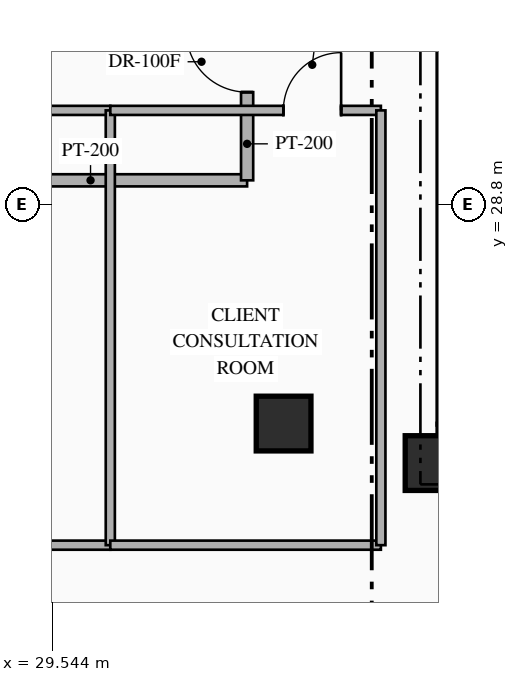
"""IFC4 building model, lengths in metres.
Left out: names, types, materials, properties, quantities, classifications, styles, units other than length and angle.
Written with IfcOpenShell. Run it as: python <this file> out.ifc"""

import sys

from ifc_helpers import new_model, si_unit, direction, frame, frame_2d, origin, origin_2d, place, context, subcontext, project, spatial, rectangle, hollow_rectangle, extrude, element, fill, save


model = new_model("IFC4")
c1 = context("Model", 3, precision=1e-05, world=origin(), true_north=direction((0.0, 1.0)))
c2 = subcontext(c1, "Body", "Model", "MODEL_VIEW")
j1 = project(units=[si_unit("LENGTHUNIT", "METRE"), si_unit("PLANEANGLEUNIT", "RADIAN")], contexts=[c1])
p1 = place(None, origin())
s1 = spatial("IfcSite", under=j1, at=p1, CompositionType="ELEMENT")
p2 = place(p1, origin())
s2 = spatial("IfcBuilding", under=s1, at=p2, CompositionType="ELEMENT")
p3 = place(p2, frame((0.0, 0.0, 108.45)))
s3 = spatial("IfcBuildingStorey", under=s2, at=p3, CompositionType="ELEMENT", Elevation=108.45)
p4 = place(p3, frame((35.89, 24.89, 0.0), z_axis=(0.0, 0.0, 1.0), x_axis=(1.0, 0.0, 0.0)))
e1 = element("IfcWall", 1, at=p4, inside=s3, PredefinedType="SHEAR", context=c2, shape_type="SweptSolid", body=[
    extrude(rectangle(XDim=7.76, YDim=0.6, at=frame_2d((3.88, 0.0))), origin(), (0.0, 0.0, 1.0), 3.6),
])
p5 = place(p3, frame((36.19, 25.19, 0.0), z_axis=(0.0, 0.0, 1.0), x_axis=(0.0, 1.0, 0.0)))
e2 = element("IfcWall", 2, at=p5, inside=s3, PredefinedType="SHEAR", context=c2, shape_type="SweptSolid", body=[
    extrude(rectangle(XDim=9.48, YDim=0.6, at=frame_2d((4.74, 0.0))), origin(), (0.0, 0.0, 1.0), 3.6),
])
p6 = place(p3, frame((35.8, 24.55, 0.0), z_axis=(0.0, 0.0, 1.0), x_axis=(1.0, 0.0, 0.0)))
e3 = element("IfcColumn", 3, at=p6, inside=s3, PredefinedType="COLUMN", context=c2, shape_type="SweptSolid", body=[
    extrude(rectangle(XDim=0.9, YDim=0.9, at=origin_2d()), origin(), (0.0, 0.0, 1.0), 3.6),
])
p7 = place(p3, frame((33.35, 25.2, 0.0), z_axis=(0.0, 0.0, 1.0), x_axis=(1.0, 0.0, 0.0)))
e4 = element("IfcColumn", 4, at=p7, inside=s3, PredefinedType="COLUMN", context=c2, shape_type="SweptSolid", body=[
    extrude(hollow_rectangle(XDim=0.9, YDim=0.9, WallThickness=0.036, at=origin_2d()), origin(), (0.0, 0.0, 1.0), 3.6),
])
p8 = place(p3, frame((53.318, 2.487, 0.0), z_axis=(0.0, 0.0, 1.0), x_axis=(-0.800004174678, 0.599994433723, 0.0)))
e5 = element("IfcWall", 5, at=p8, inside=s3, PredefinedType="STANDARD", context=c2, shape_type="SweptSolid", body=[
    extrude(rectangle(XDim=35.089, YDim=0.28, at=frame_2d((17.544, 0.0))), origin(), (0.0, 0.0, 1.0), 3.35),
])
p9 = place(p3, frame((27.6, 29.2, 0.0), z_axis=(0.0, 0.0, 1.0), x_axis=(1.0, 0.0, 0.0)))
e6 = element("IfcWall", 6, at=p9, inside=s3, PredefinedType="STANDARD", context=c2, shape_type="SweptSolid", body=[
    extrude(rectangle(XDim=5.15, YDim=0.2, at=frame_2d((2.575, 0.0))), origin(), (0.0, 0.0, 1.0), 3.35),
])
p10 = place(p3, frame((32.75, 29.2, 0.0), z_axis=(0.0, 0.0, 1.0), x_axis=(0.0, 1.0, 0.0)))
e7 = element("IfcWall", 7, at=p10, inside=s3, PredefinedType="STANDARD", context=c2, shape_type="SweptSolid", body=[
    extrude(rectangle(XDim=3.39, YDim=0.2, at=frame_2d((1.695, 0.0))), origin(), (0.0, 0.0, 1.0), 3.35),
])
p11 = place(p10, frame((1.45, 0.0, 0.0)))
e8 = element("IfcOpeningElement", 8, at=p11, cuts=e7, PredefinedType="OPENING", context=c2, shape_type="SweptSolid", body=[
    extrude(rectangle(XDim=1.0, YDim=2.2, at=frame_2d((0.5, 1.1))), frame((0.0, 0.11, 0.0), z_axis=(0.0, -1.0, 0.0), x_axis=(1.0, 0.0, 0.0)), (0.0, 0.0, 1.0), 0.22),
])
p12 = place(p3, frame((25.55, 23.2, 0.0), z_axis=(0.0, 0.0, 1.0), x_axis=(1.0, 0.0, 0.0)))
e9 = element("IfcWall", 9, at=p12, inside=s3, PredefinedType="PARTITIONING", context=c2, shape_type="SweptSolid", body=[
    extrude(rectangle(XDim=4.95, YDim=0.15, at=frame_2d((2.475, 0.0))), origin(), (0.0, 0.0, 1.0), 3.35),
])
p13 = place(p3, frame((25.55, 30.35, 0.0), z_axis=(0.0, 0.0, 1.0), x_axis=(1.0, 0.0, 0.0)))
e10 = element("IfcWall", 10, at=p13, inside=s3, PredefinedType="PARTITIONING", context=c2, shape_type="SweptSolid", body=[
    extrude(rectangle(XDim=4.95, YDim=0.15, at=frame_2d((2.475, 0.0))), origin(), (0.0, 0.0, 1.0), 3.35),
])
p14 = place(p13, frame((0.542, 0.0, 0.0)))
e11 = element("IfcOpeningElement", 11, at=p14, cuts=e10, PredefinedType="OPENING", context=c2, shape_type="SweptSolid", body=[
    extrude(rectangle(XDim=0.95, YDim=2.15, at=frame_2d((0.475, 1.075))), frame((0.0, 0.085, 0.0), z_axis=(0.0, -1.0, 0.0), x_axis=(1.0, 0.0, 0.0)), (0.0, 0.0, 1.0), 0.17),
])
p15 = place(p3, frame((30.5, 23.2, 0.0), z_axis=(0.0, 0.0, 1.0), x_axis=(0.0, 1.0, 0.0)))
e12 = element("IfcWall", 12, at=p15, inside=s3, PredefinedType="PARTITIONING", context=c2, shape_type="SweptSolid", body=[
    extrude(rectangle(XDim=7.15, YDim=0.15, at=frame_2d((3.575, 0.0))), origin(), (0.0, 0.0, 1.0), 3.35),
])
p16 = place(p3, frame((30.5, 23.2, 0.0), z_axis=(0.0, 0.0, 1.0), x_axis=(1.0, 0.0, 0.0)))
e13 = element("IfcWall", 13, at=p16, inside=s3, PredefinedType="PARTITIONING", context=c2, shape_type="SweptSolid", body=[
    extrude(rectangle(XDim=4.45, YDim=0.15, at=frame_2d((2.225, 0.0))), origin(), (0.0, 0.0, 1.0), 3.35),
])
p17 = place(p3, frame((30.5, 30.35, 0.0), z_axis=(0.0, 0.0, 1.0), x_axis=(1.0, 0.0, 0.0)))
e14 = element("IfcWall", 14, at=p17, inside=s3, PredefinedType="PARTITIONING", context=c2, shape_type="SweptSolid", body=[
    extrude(rectangle(XDim=4.45, YDim=0.15, at=frame_2d((2.225, 0.0))), origin(), (0.0, 0.0, 1.0), 3.35),
])
p18 = place(p17, frame((2.846, 0.0, 0.0)))
e15 = element("IfcOpeningElement", 15, at=p18, cuts=e14, PredefinedType="OPENING", context=c2, shape_type="SweptSolid", body=[
    extrude(rectangle(XDim=0.95, YDim=2.15, at=frame_2d((0.475, 1.075))), frame((0.0, 0.085, 0.0), z_axis=(0.0, -1.0, 0.0), x_axis=(1.0, 0.0, 0.0)), (0.0, 0.0, 1.0), 0.17),
])
p19 = place(p3, frame((34.95, 23.2, 0.0), z_axis=(0.0, 0.0, 1.0), x_axis=(0.0, 1.0, 0.0)))
e16 = element("IfcWall", 16, at=p19, inside=s3, PredefinedType="PARTITIONING", context=c2, shape_type="SweptSolid", body=[
    extrude(rectangle(XDim=7.15, YDim=0.15, at=frame_2d((3.575, 0.0))), origin(), (0.0, 0.0, 1.0), 3.35),
])
p20 = place(p11, origin())
e17 = element("IfcDoor", 17, at=p20, inside=s3, OperationType="SINGLE_SWING_RIGHT", PredefinedType="DOOR", context=c2, shape_type="SweptSolid", body=[
    extrude(rectangle(XDim=1.0, YDim=2.2, at=frame_2d((0.5, 1.1))), frame((0.0, 0.025, 0.0), z_axis=(0.0, -1.0, 0.0), x_axis=(1.0, 0.0, 0.0)), (0.0, 0.0, 1.0), 0.05),
])
fill(e8, e17)
p21 = place(p18, origin())
e18 = element("IfcDoor", 18, at=p21, inside=s3, OperationType="SINGLE_SWING_RIGHT", PredefinedType="DOOR", context=c2, shape_type="SweptSolid", body=[
    extrude(rectangle(XDim=0.95, YDim=2.15, at=frame_2d((0.475, 1.075))), frame((0.0, 0.025, 0.0), z_axis=(0.0, -1.0, 0.0), x_axis=(1.0, 0.0, 0.0)), (0.0, 0.0, 1.0), 0.05),
])
fill(e15, e18)
save(model, sys.argv[1])
